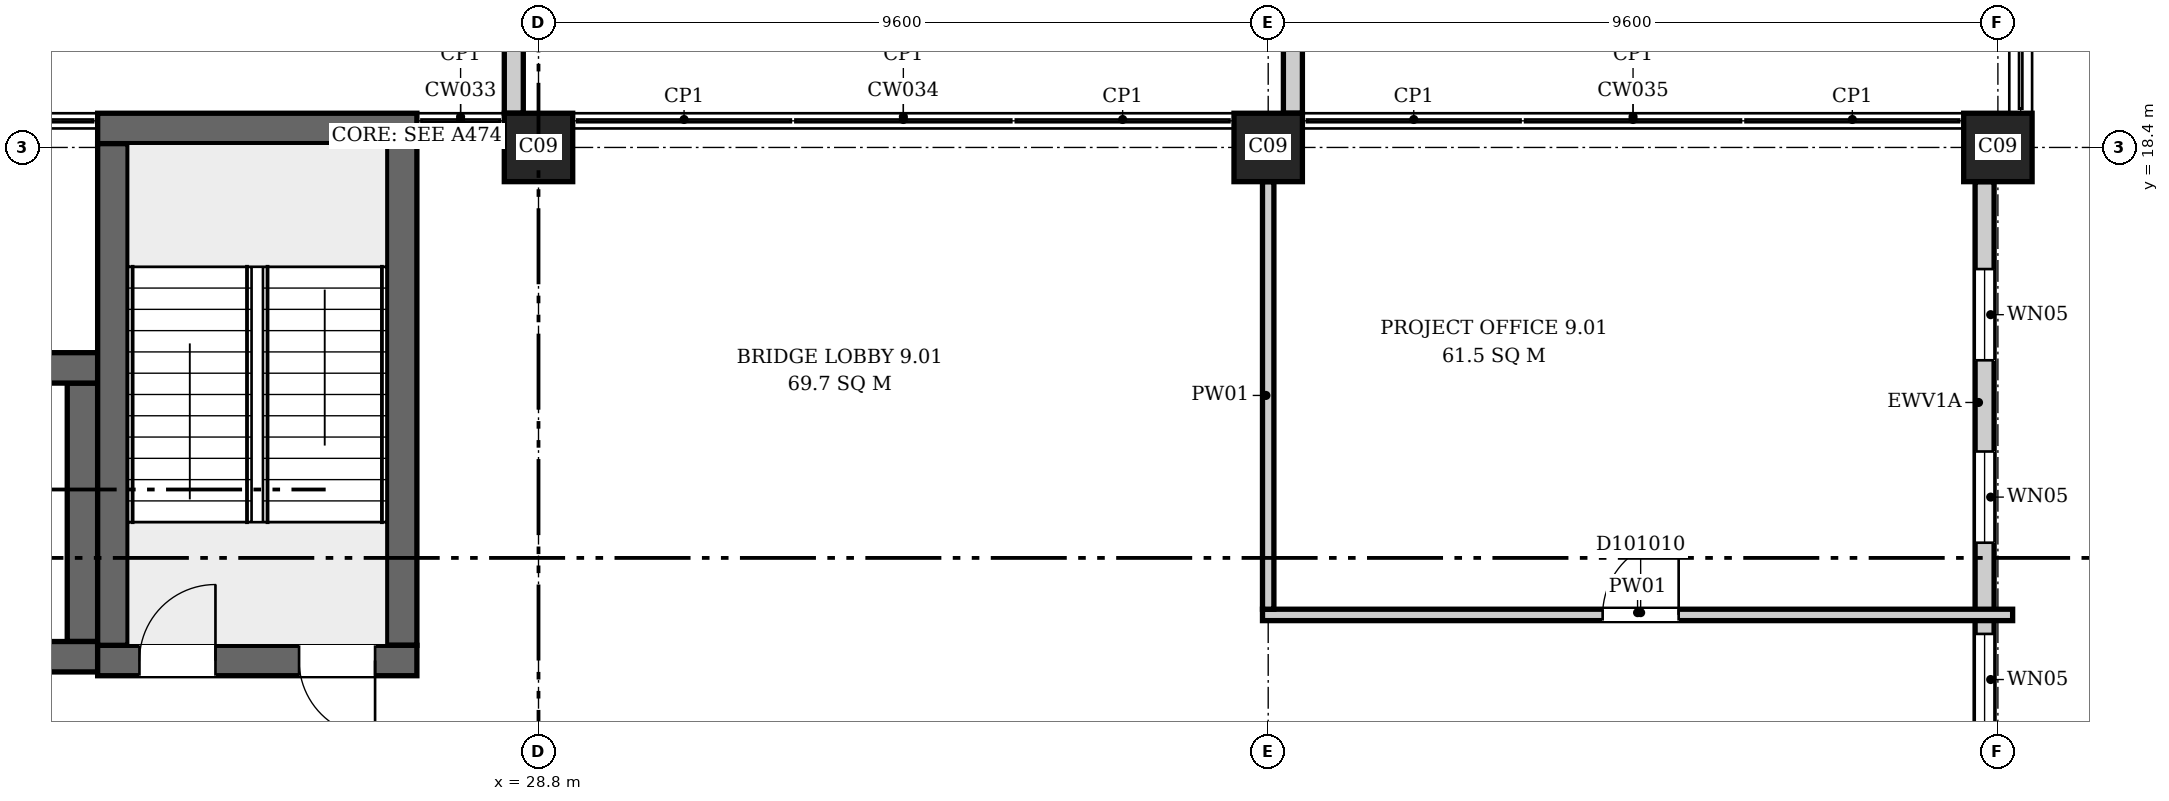
"""IFC4 building model, lengths in metres.
Left out: names, types, materials, properties, quantities, classifications, styles, units other than length and angle.
Written with IfcOpenShell. Run it as: python <this file> out.ifc"""

import sys

from ifc_helpers import new_model, si_unit, direction, frame, frame_2d, origin, origin_2d, place, context, subcontext, project, spatial, rectangle, extrude, element, fill, save


model = new_model("IFC4")
c1 = context("Model", 3, precision=1e-05, world=origin(), true_north=direction((0.0, 1.0)))
c2 = subcontext(c1, "Body", "Model", "MODEL_VIEW")
j1 = project(units=[si_unit("LENGTHUNIT", "METRE"), si_unit("PLANEANGLEUNIT", "RADIAN")], contexts=[c1])
p1 = place(None, origin())
s1 = spatial("IfcSite", under=j1, at=p1, CompositionType="ELEMENT")
p2 = place(p1, origin())
s2 = spatial("IfcBuilding", under=s1, at=p2, CompositionType="ELEMENT")
p3 = place(p2, frame((0.0, 0.0, 48.7)))
s3 = spatial("IfcBuildingStorey", under=s2, at=p3, CompositionType="ELEMENT", Elevation=48.7)
p4 = place(p3, frame((23.0, 11.65, 0.0), z_axis=(0.0, 0.0, 1.0), x_axis=(1.0, 0.0, 0.0)))
e1 = element("IfcWall", 1, at=p4, inside=s3, PredefinedType="SHEAR", context=c2, shape_type="SweptSolid", body=[
    extrude(rectangle(XDim=4.2, YDim=0.4, at=frame_2d((2.1, 0.0))), origin(), (0.0, 0.0, 1.0), 4.2),
])
p5 = place(p4, frame((0.55, 0.0, 0.0)))
e2 = element("IfcOpeningElement", 2, at=p5, cuts=e1, PredefinedType="OPENING", context=c2, shape_type="SweptSolid", body=[
    extrude(rectangle(XDim=1.0, YDim=2.1, at=frame_2d((0.5, 1.05))), frame((0.0, 0.21, 0.0), z_axis=(0.0, -1.0, 0.0), x_axis=(1.0, 0.0, 0.0)), (0.0, 0.0, 1.0), 0.42),
])
p6 = place(p4, frame((2.65, 0.0, 0.0)))
e3 = element("IfcOpeningElement", 3, at=p6, cuts=e1, PredefinedType="OPENING", context=c2, shape_type="SweptSolid", body=[
    extrude(rectangle(XDim=1.0, YDim=2.1, at=frame_2d((0.5, 1.05))), frame((0.0, 0.21, 0.0), z_axis=(0.0, -1.0, 0.0), x_axis=(1.0, 0.0, 0.0)), (0.0, 0.0, 1.0), 0.42),
])
p7 = place(p3, frame((23.0, 18.65, 0.0), z_axis=(0.0, 0.0, 1.0), x_axis=(1.0, 0.0, 0.0)))
e4 = element("IfcWall", 4, at=p7, inside=s3, PredefinedType="SHEAR", context=c2, shape_type="SweptSolid", body=[
    extrude(rectangle(XDim=4.2, YDim=0.4, at=frame_2d((2.1, 0.0))), origin(), (0.0, 0.0, 1.0), 4.2),
])
for number, where, z_axis, x_axis in (
    (5, (23.2, 11.85, 0.0), (0.0, 0.0, 1.0), (0.0, 1.0, 0.0)),
    (6, (27.0, 11.85, 0.0), (0.0, 0.0, 1.0), (0.0, 1.0, 0.0)),
):
    element("IfcWall", number, at=place(p3, frame(where, z_axis=z_axis, x_axis=x_axis)), inside=s3, PredefinedType="SHEAR", context=c2, shape_type="SweptSolid", body=[
        extrude(rectangle(XDim=6.6, YDim=0.4, at=frame_2d((3.3, 0.0))), origin(), (0.0, 0.0, 1.0), 4.2),
    ])
p8 = place(p3, frame((19.9, 11.7, 0.0), z_axis=(0.0, 0.0, 1.0), x_axis=(1.0, 0.0, 0.0)))
e7 = element("IfcWall", 7, at=p8, inside=s3, PredefinedType="SHEAR", context=c2, shape_type="SweptSolid", body=[
    extrude(rectangle(XDim=3.1, YDim=0.4, at=frame_2d((1.55, 0.0))), origin(), (0.0, 0.0, 1.0), 4.2),
])
p9 = place(p3, frame((19.9, 15.5, 0.0), z_axis=(0.0, 0.0, 1.0), x_axis=(1.0, 0.0, 0.0)))
e8 = element("IfcWall", 8, at=p9, inside=s3, PredefinedType="SHEAR", context=c2, shape_type="SweptSolid", body=[
    extrude(rectangle(XDim=3.1, YDim=0.4, at=frame_2d((1.55, 0.0))), origin(), (0.0, 0.0, 1.0), 4.2),
])
p10 = place(p9, frame((0.95, 0.0, 0.0)))
e9 = element("IfcOpeningElement", 9, at=p10, cuts=e8, PredefinedType="OPENING", context=c2, shape_type="SweptSolid", body=[
    extrude(rectangle(XDim=1.2, YDim=2.1, at=frame_2d((0.6, 1.05))), frame((0.0, 0.21, 0.0), z_axis=(0.0, -1.0, 0.0), x_axis=(1.0, 0.0, 0.0)), (0.0, 0.0, 1.0), 0.42),
])
p11 = place(p3, frame((22.8, 11.9, 0.0), z_axis=(0.0, 0.0, 1.0), x_axis=(0.0, 1.0, 0.0)))
e10 = element("IfcWall", 10, at=p11, inside=s3, PredefinedType="SHEAR", context=c2, shape_type="SweptSolid", body=[
    extrude(rectangle(XDim=3.4, YDim=0.4, at=frame_2d((1.7, 0.0))), origin(), (0.0, 0.0, 1.0), 4.2),
])
for number, where, z_axis, x_axis in (
    (11, (28.8, 18.4, 0.0), (0.0, 0.0, 1.0), (1.0, 0.0, 0.0)),
    (12, (38.4, 18.4, 0.0), (0.0, 0.0, 1.0), (1.0, 0.0, 0.0)),
    (13, (48.0, 18.4, 0.0), (0.0, 0.0, 1.0), (1.0, 0.0, 0.0)),
):
    element("IfcColumn", number, at=place(p3, frame(where, z_axis=z_axis, x_axis=x_axis)), inside=s3, PredefinedType="COLUMN", context=c2, shape_type="SweptSolid", body=[
        extrude(rectangle(XDim=0.9, YDim=0.9, at=origin_2d()), origin(), (0.0, 0.0, 1.0), 4.2),
    ])
p12 = place(p3, frame((47.825, 9.65, 0.0), z_axis=(0.0, 0.0, 1.0), x_axis=(0.0, 1.0, 0.0)))
e14 = element("IfcWall", 14, at=p12, inside=s3, PredefinedType="ELEMENTEDWALL", context=c2, shape_type="SweptSolid", body=[
    extrude(rectangle(XDim=8.3, YDim=0.25, at=frame_2d((4.15, 0.0))), origin(), (0.0, 0.0, 1.0), 3.3),
])
p13 = place(p12, frame((1.15, 0.0, 0.6)))
e15 = element("IfcOpeningElement", 15, at=p13, cuts=e14, PredefinedType="OPENING", context=c2, shape_type="SweptSolid", body=[
    extrude(rectangle(XDim=1.2, YDim=2.6, at=frame_2d((0.6, 1.3))), frame((0.0, 0.135, 0.0), z_axis=(0.0, -1.0, 0.0), x_axis=(1.0, 0.0, 0.0)), (0.0, 0.0, 1.0), 0.27),
])
p14 = place(p12, frame((3.55, 0.0, 0.6)))
e16 = element("IfcOpeningElement", 16, at=p14, cuts=e14, PredefinedType="OPENING", context=c2, shape_type="SweptSolid", body=[
    extrude(rectangle(XDim=1.2, YDim=2.6, at=frame_2d((0.6, 1.3))), frame((0.0, 0.135, 0.0), z_axis=(0.0, -1.0, 0.0), x_axis=(1.0, 0.0, 0.0)), (0.0, 0.0, 1.0), 0.27),
])
p15 = place(p12, frame((5.95, 0.0, 0.6)))
e17 = element("IfcOpeningElement", 17, at=p15, cuts=e14, PredefinedType="OPENING", context=c2, shape_type="SweptSolid", body=[
    extrude(rectangle(XDim=1.2, YDim=2.6, at=frame_2d((0.6, 1.3))), frame((0.0, 0.135, 0.0), z_axis=(0.0, -1.0, 0.0), x_axis=(1.0, 0.0, 0.0)), (0.0, 0.0, 1.0), 0.27),
])
for number, where, z_axis, x_axis in (
    (18, (38.725, 18.85, 4.2), (0.0, 0.0, 1.0), (0.0, 1.0, 0.0)),
    (19, (28.475, 27.15, 4.2), (0.0, 0.0, 1.0), (0.0, -1.0, 0.0)),
):
    element("IfcWall", number, at=place(p3, frame(where, z_axis=z_axis, x_axis=x_axis)), inside=s3, PredefinedType="PARAPET", context=c2, shape_type="SweptSolid", body=[
        extrude(rectangle(XDim=8.3, YDim=0.25, at=frame_2d((4.15, 0.0))), origin(), (0.0, 0.0, 1.0), 1.1),
    ])
p16 = place(p3, frame((38.325, 12.25, 0.0), z_axis=(0.0, 0.0, 1.0), x_axis=(1.0, 0.0, 0.0)))
e20 = element("IfcWall", 20, at=p16, inside=s3, PredefinedType="PARTITIONING", context=c2, shape_type="SweptSolid", body=[
    extrude(rectangle(XDim=9.869, YDim=0.15, at=frame_2d((4.935, 0.0))), origin(), (0.0, 0.0, 1.0), 3.9),
])
p17 = place(p16, frame((4.475, 0.0, 0.0)))
e21 = element("IfcOpeningElement", 21, at=p17, cuts=e20, PredefinedType="OPENING", context=c2, shape_type="SweptSolid", body=[
    extrude(rectangle(XDim=1.0, YDim=2.1, at=frame_2d((0.5, 1.05))), frame((0.0, 0.085, 0.0), z_axis=(0.0, -1.0, 0.0), x_axis=(1.0, 0.0, 0.0)), (0.0, 0.0, 1.0), 0.17),
])
p18 = place(p3, frame((38.4, 12.325, 0.0), z_axis=(0.0, 0.0, 1.0), x_axis=(0.0, 1.0, 0.0)))
e22 = element("IfcWall", 22, at=p18, inside=s3, PredefinedType="PARTITIONING", context=c2, shape_type="SweptSolid", body=[
    extrude(rectangle(XDim=5.625, YDim=0.15, at=frame_2d((2.812, 0.0))), origin(), (0.0, 0.0, 1.0), 3.9),
])
p19 = place(p13, origin())
e23 = element("IfcWindow", 23, at=p19, inside=s3, PartitioningType="SINGLE_PANEL", PredefinedType="WINDOW", context=c2, shape_type="SweptSolid", body=[
    extrude(rectangle(XDim=1.2, YDim=2.6, at=frame_2d((0.6, 1.3))), frame((0.0, 0.03, 0.0), z_axis=(0.0, -1.0, 0.0), x_axis=(1.0, 0.0, 0.0)), (0.0, 0.0, 1.0), 0.06),
])
fill(e15, e23)
p20 = place(p14, origin())
e24 = element("IfcWindow", 24, at=p20, inside=s3, PartitioningType="SINGLE_PANEL", PredefinedType="WINDOW", context=c2, shape_type="SweptSolid", body=[
    extrude(rectangle(XDim=1.2, YDim=2.6, at=frame_2d((0.6, 1.3))), frame((0.0, 0.03, 0.0), z_axis=(0.0, -1.0, 0.0), x_axis=(1.0, 0.0, 0.0)), (0.0, 0.0, 1.0), 0.06),
])
fill(e16, e24)
p21 = place(p15, origin())
e25 = element("IfcWindow", 25, at=p21, inside=s3, PartitioningType="SINGLE_PANEL", PredefinedType="WINDOW", context=c2, shape_type="SweptSolid", body=[
    extrude(rectangle(XDim=1.2, YDim=2.6, at=frame_2d((0.6, 1.3))), frame((0.0, 0.03, 0.0), z_axis=(0.0, -1.0, 0.0), x_axis=(1.0, 0.0, 0.0)), (0.0, 0.0, 1.0), 0.06),
])
fill(e17, e25)
p22 = place(p5, origin())
e26 = element("IfcDoor", 26, at=p22, inside=s3, OperationType="SINGLE_SWING_RIGHT", PredefinedType="DOOR", context=c2, shape_type="SweptSolid", body=[
    extrude(rectangle(XDim=1.0, YDim=2.1, at=frame_2d((0.5, 1.05))), frame((0.0, 0.025, 0.0), z_axis=(0.0, -1.0, 0.0), x_axis=(1.0, 0.0, 0.0)), (0.0, 0.0, 1.0), 0.05),
])
fill(e2, e26)
p23 = place(p6, origin())
e27 = element("IfcDoor", 27, at=p23, inside=s3, OperationType="SINGLE_SWING_LEFT", PredefinedType="DOOR", context=c2, shape_type="SweptSolid", body=[
    extrude(rectangle(XDim=1.0, YDim=2.1, at=frame_2d((0.5, 1.05))), frame((0.0, 0.025, 0.0), z_axis=(0.0, -1.0, 0.0), x_axis=(1.0, 0.0, 0.0)), (0.0, 0.0, 1.0), 0.05),
])
fill(e3, e27)
p24 = place(p17, origin())
e28 = element("IfcDoor", 28, at=p24, inside=s3, OperationType="SINGLE_SWING_RIGHT", PredefinedType="DOOR", context=c2, shape_type="SweptSolid", body=[
    extrude(rectangle(XDim=1.0, YDim=2.1, at=frame_2d((0.5, 1.05))), frame((0.0, 0.025, 0.0), z_axis=(0.0, -1.0, 0.0), x_axis=(1.0, 0.0, 0.0)), (0.0, 0.0, 1.0), 0.05),
])
fill(e21, e28)
save(model, sys.argv[1])
